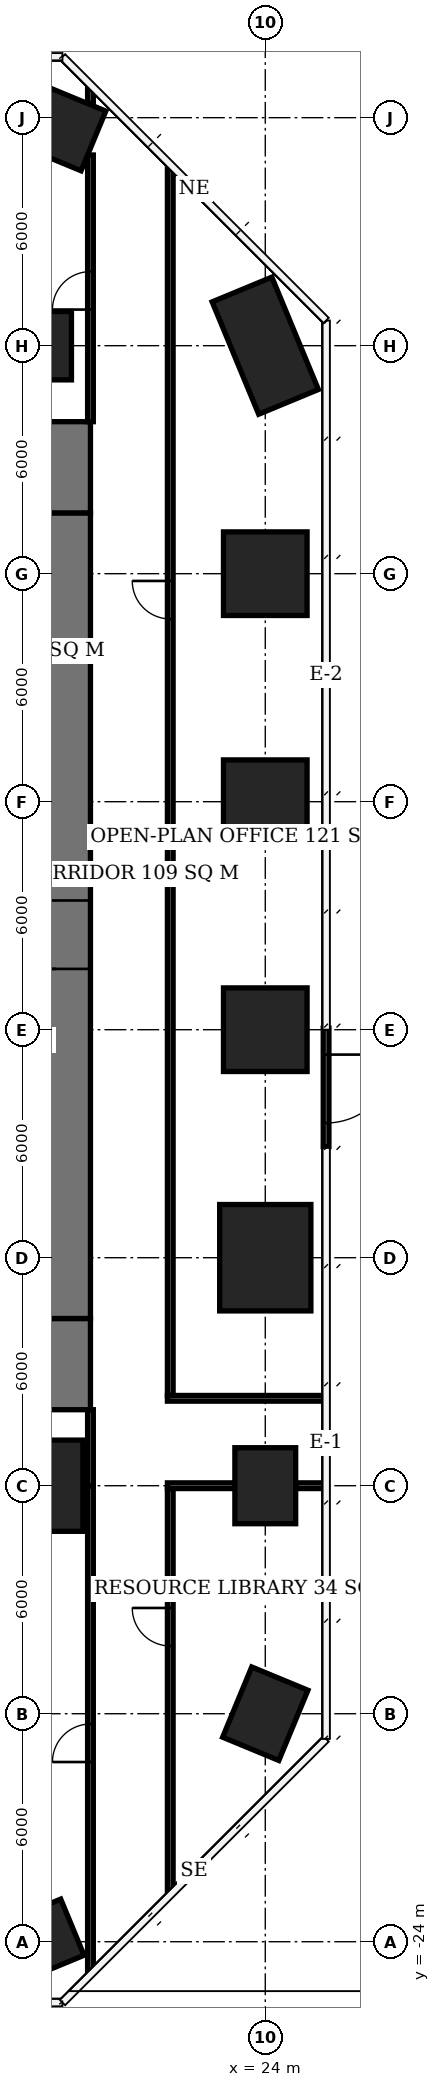
"""IFC4 building model, lengths in metres.
Left out: names, types, materials, properties, quantities, classifications, styles, units other than length and angle.
Written with IfcOpenShell. Run it as: python <this file> out.ifc"""

import sys

from ifc_helpers import new_model, si_unit, direction, frame, frame_2d, origin, origin_2d, place, context, subcontext, project, spatial, rectangle, extrude, element, fill, save


model = new_model("IFC4")
c1 = context("Model", 3, precision=1e-05, world=origin(), true_north=direction((0.0, 1.0)))
c2 = subcontext(c1, "Body", "Model", "MODEL_VIEW")
j1 = project(units=[si_unit("LENGTHUNIT", "METRE"), si_unit("PLANEANGLEUNIT", "RADIAN")], contexts=[c1])
p1 = place(None, origin())
s1 = spatial("IfcSite", under=j1, at=p1, CompositionType="ELEMENT")
p2 = place(p1, origin())
s2 = spatial("IfcBuilding", under=s1, at=p2, CompositionType="ELEMENT")
p3 = place(p2, frame((0.0, 0.0, 18.2)))
s3 = spatial("IfcBuildingStorey", under=s2, at=p3, CompositionType="ELEMENT", Elevation=18.2)
p4 = place(p3, frame((18.0, -24.0, 0.0), z_axis=(0.0, 0.0, 1.0), x_axis=(-0.923879532511, -0.382683432365, 0.0)))
e1 = element("IfcColumn", 1, at=p4, inside=s3, PredefinedType="COLUMN", context=c2, shape_type="SweptSolid", body=[
    extrude(rectangle(XDim=2.0, YDim=1.6, at=origin_2d()), origin(), (0.0, 0.0, 1.0), 3.9),
])
p5 = place(p3, frame((18.0, -12.0, 0.0), z_axis=(0.0, 0.0, 1.0), x_axis=(1.0, 0.0, 0.0)))
e2 = element("IfcColumn", 2, at=p5, inside=s3, PredefinedType="COLUMN", context=c2, shape_type="SweptSolid", body=[
    extrude(rectangle(XDim=2.4, YDim=2.4, at=origin_2d()), origin(), (0.0, 0.0, 1.0), 3.9),
])
p6 = place(p3, frame((18.0, 18.0, 0.0), z_axis=(0.0, 0.0, 1.0), x_axis=(1.0, 0.0, 0.0)))
e3 = element("IfcColumn", 3, at=p6, inside=s3, PredefinedType="COLUMN", context=c2, shape_type="SweptSolid", body=[
    extrude(rectangle(XDim=1.8, YDim=1.8, at=origin_2d()), origin(), (0.0, 0.0, 1.0), 3.9),
])
p7 = place(p3, frame((18.0, 24.0, 0.0), z_axis=(0.0, 0.0, 1.0), x_axis=(0.923879532511, -0.382683432365, 0.0)))
e4 = element("IfcColumn", 4, at=p7, inside=s3, PredefinedType="COLUMN", context=c2, shape_type="SweptSolid", body=[
    extrude(rectangle(XDim=3.2, YDim=1.7, at=origin_2d()), origin(), (0.0, 0.0, 1.0), 3.9),
])
for number, where, z_axis, x_axis in (
    (5, (24.0, -18.0, 0.0), (0.0, 0.0, 1.0), (-0.383, -0.924, 0.0)),
    (6, (24.0, -12.0, 0.0), (0.0, 0.0, 1.0), (0.0, 1.0, 0.0)),
):
    element("IfcColumn", number, at=place(p3, frame(where, z_axis=z_axis, x_axis=x_axis)), inside=s3, PredefinedType="COLUMN", context=c2, shape_type="SweptSolid", body=[
        extrude(rectangle(XDim=2.0, YDim=1.6, at=origin_2d()), origin(), (0.0, 0.0, 1.0), 3.9),
    ])
p8 = place(p3, frame((24.0, -6.0, 0.0), z_axis=(0.0, 0.0, 1.0), x_axis=(0.0, 1.0, 0.0)))
e7 = element("IfcColumn", 7, at=p8, inside=s3, PredefinedType="COLUMN", context=c2, shape_type="SweptSolid", body=[
    extrude(rectangle(XDim=2.8, YDim=2.4, at=origin_2d()), origin(), (0.0, 0.0, 1.0), 3.9),
])
for number, where, z_axis, x_axis in (
    (8, (24.0, 0.0, 0.0), (0.0, 0.0, 1.0), (1.0, 0.0, 0.0)),
    (9, (24.0, 6.0, 0.0), (0.0, 0.0, 1.0), (1.0, 0.0, 0.0)),
    (10, (24.0, 12.0, 0.0), (0.0, 0.0, 1.0), (1.0, 0.0, 0.0)),
):
    element("IfcColumn", number, at=place(p3, frame(where, z_axis=z_axis, x_axis=x_axis)), inside=s3, PredefinedType="COLUMN", context=c2, shape_type="SweptSolid", body=[
        extrude(rectangle(XDim=2.2, YDim=2.2, at=origin_2d()), origin(), (0.0, 0.0, 1.0), 3.9),
    ])
p9 = place(p3, frame((24.0, 18.0, 0.0), z_axis=(0.0, 0.0, 1.0), x_axis=(0.382683432365, -0.923879532511, 0.0)))
e11 = element("IfcColumn", 11, at=p9, inside=s3, PredefinedType="COLUMN", context=c2, shape_type="SweptSolid", body=[
    extrude(rectangle(XDim=3.2, YDim=1.7, at=origin_2d()), origin(), (0.0, 0.0, 1.0), 3.9),
])
p10 = place(p3, frame((18.5, -7.6, 0.0), z_axis=(0.0, 0.0, 1.0), x_axis=(0.0, 1.0, 0.0)))
e12 = element("IfcWall", 12, at=p10, inside=s3, PredefinedType="SHEAR", context=c2, shape_type="SweptSolid", body=[
    extrude(rectangle(XDim=21.2, YDim=1.8, at=frame_2d((10.6, 0.0))), origin(), (0.0, 0.0, 1.0), 3.9),
])
p11 = place(p10, frame((9.2, 0.0, 0.0)))
e13 = element("IfcOpeningElement", 13, at=p11, cuts=e12, PredefinedType="OPENING", context=c2, shape_type="SweptSolid", body=[
    extrude(rectangle(XDim=1.8, YDim=2.4, at=frame_2d((0.9, 1.2))), frame((0.0, 0.91, 0.0), z_axis=(0.0, -1.0, 0.0), x_axis=(1.0, 0.0, 0.0)), (0.0, 0.0, 1.0), 1.82),
])
for number, where, z_axis, x_axis in (
    (14, (18.5, -10.0, 0.0), (0.0, 0.0, 1.0), (0.0, 1.0, 0.0)),
    (15, (18.5, 13.6, 0.0), (0.0, 0.0, 1.0), (0.0, 1.0, 0.0)),
):
    element("IfcWall", number, at=place(p3, frame(where, z_axis=z_axis, x_axis=x_axis)), inside=s3, PredefinedType="SHEAR", context=c2, shape_type="SweptSolid", body=[
        extrude(rectangle(XDim=2.4, YDim=1.8, at=frame_2d((1.2, 0.0))), origin(), (0.0, 0.0, 1.0), 3.9),
    ])
p12 = place(p3, frame((25.6, 0.042, 0.0), z_axis=(0.0, 0.0, 1.0), x_axis=(0.0, -1.0, 0.0)))
e16 = element("IfcWall", 16, at=p12, inside=s3, PredefinedType="USERDEFINED", context=c2, shape_type="SweptSolid", body=[
    extrude(rectangle(XDim=3.12, YDim=0.15, at=frame_2d((1.56, 0.0))), origin(), (0.0, 0.0, 1.0), 3.9),
])
p13 = place(p12, frame((0.698, 0.0, 0.0)))
e17 = element("IfcOpeningElement", 17, at=p13, cuts=e16, PredefinedType="OPENING", context=c2, shape_type="SweptSolid", body=[
    extrude(rectangle(XDim=1.8, YDim=2.4, at=frame_2d((0.9, 1.2))), frame((0.0, 0.085, 0.0), z_axis=(0.0, -1.0, 0.0), x_axis=(1.0, 0.0, 0.0)), (0.0, 0.0, 1.0), 0.17),
])
p14 = place(p3, frame((19.4, -24.771, 0.0), z_axis=(0.0, 0.0, 1.0), x_axis=(0.0, 1.0, 0.0)))
e18 = element("IfcWall", 18, at=p14, inside=s3, PredefinedType="PARTITIONING", context=c2, shape_type="SweptSolid", body=[
    extrude(rectangle(XDim=12.771, YDim=0.15, at=frame_2d((6.385, 0.0))), origin(), (0.0, 0.0, 1.0), 3.65),
])
p15 = place(p14, frame((5.5, 0.0, 0.0)))
e19 = element("IfcOpeningElement", 19, at=p15, cuts=e18, PredefinedType="OPENING", context=c2, shape_type="SweptSolid", body=[
    extrude(rectangle(XDim=1.0, YDim=2.1, at=frame_2d((0.5, 1.05))), frame((0.0, 0.085, 0.0), z_axis=(0.0, -1.0, 0.0), x_axis=(1.0, 0.0, 0.0)), (0.0, 0.0, 1.0), 0.17),
])
p16 = place(p3, frame((19.4, -12.0, 0.0), z_axis=(0.0, 0.0, 1.0), x_axis=(0.0, 1.0, 0.0)))
e20 = element("IfcWall", 20, at=p16, inside=s3, PredefinedType="PARTITIONING", context=c2, shape_type="SweptSolid", body=[
    extrude(rectangle(XDim=2.0, YDim=0.15, at=frame_2d((1.0, 0.0))), origin(), (0.0, 0.0, 1.0), 3.65),
])
p17 = place(p3, frame((19.4, 16.0, 0.0), z_axis=(0.0, 0.0, 1.0), x_axis=(0.0, 1.0, 0.0)))
e21 = element("IfcWall", 21, at=p17, inside=s3, PredefinedType="PARTITIONING", context=c2, shape_type="SweptSolid", body=[
    extrude(rectangle(XDim=7.018, YDim=0.15, at=frame_2d((3.509, 0.0))), origin(), (0.0, 0.0, 1.0), 3.65),
])
p18 = place(p17, frame((2.95, 0.0, 0.0)))
e22 = element("IfcOpeningElement", 22, at=p18, cuts=e21, PredefinedType="OPENING", context=c2, shape_type="SweptSolid", body=[
    extrude(rectangle(XDim=1.0, YDim=2.1, at=frame_2d((0.5, 1.05))), frame((0.0, 0.085, 0.0), z_axis=(0.0, -1.0, 0.0), x_axis=(1.0, 0.0, 0.0)), (0.0, 0.0, 1.0), 0.17),
])
p19 = place(p3, frame((19.4, 24.371, 0.0), z_axis=(0.0, 0.0, 1.0), x_axis=(0.0, 1.0, 0.0)))
e23 = element("IfcWall", 23, at=p19, inside=s3, PredefinedType="PARTITIONING", context=c2, shape_type="SweptSolid", body=[
    extrude(rectangle(XDim=0.4, YDim=0.15, at=frame_2d((0.2, 0.0))), origin(), (0.0, 0.0, 1.0), 3.65),
])
p20 = place(p3, frame((21.5, -22.671, 0.0), z_axis=(0.0, 0.0, 1.0), x_axis=(0.0, 1.0, 0.0)))
e24 = element("IfcWall", 24, at=p20, inside=s3, PredefinedType="PARTITIONING", context=c2, shape_type="SweptSolid", body=[
    extrude(rectangle(XDim=10.596, YDim=0.15, at=frame_2d((5.298, 0.0))), origin(), (0.0, 0.0, 1.0), 3.65),
])
p21 = place(p20, frame((6.454, 0.0, 0.0)))
e25 = element("IfcOpeningElement", 25, at=p21, cuts=e24, PredefinedType="OPENING", context=c2, shape_type="SweptSolid", body=[
    extrude(rectangle(XDim=1.0, YDim=2.1, at=frame_2d((0.5, 1.05))), frame((0.0, 0.085, 0.0), z_axis=(0.0, -1.0, 0.0), x_axis=(1.0, 0.0, 0.0)), (0.0, 0.0, 1.0), 0.17),
])
p22 = place(p3, frame((21.425, -12.0, 0.0), z_axis=(0.0, 0.0, 1.0), x_axis=(1.0, 0.0, 0.0)))
e26 = element("IfcWall", 26, at=p22, inside=s3, PredefinedType="PARTITIONING", context=c2, shape_type="SweptSolid", body=[
    extrude(rectangle(XDim=1.775, YDim=0.15, at=frame_2d((0.887, 0.0))), origin(), (0.0, 0.0, 1.0), 3.65),
])
p23 = place(p3, frame((24.8, -12.0, 0.0), z_axis=(0.0, 0.0, 1.0), x_axis=(1.0, 0.0, 0.0)))
e27 = element("IfcWall", 27, at=p23, inside=s3, PredefinedType="PARTITIONING", context=c2, shape_type="SweptSolid", body=[
    extrude(rectangle(XDim=0.8, YDim=0.15, at=frame_2d((0.4, 0.0))), origin(), (0.0, 0.0, 1.0), 3.65),
])
p24 = place(p3, frame((21.5, -9.625, 0.0), z_axis=(0.0, 0.0, 1.0), x_axis=(0.0, 1.0, 0.0)))
e28 = element("IfcWall", 28, at=p24, inside=s3, PredefinedType="PARTITIONING", context=c2, shape_type="SweptSolid", body=[
    extrude(rectangle(XDim=32.296, YDim=0.15, at=frame_2d((16.148, 0.0))), origin(), (0.0, 0.0, 1.0), 3.65),
])
p25 = place(p24, frame((20.434, 0.0, 0.0)))
e29 = element("IfcOpeningElement", 29, at=p25, cuts=e28, PredefinedType="OPENING", context=c2, shape_type="SweptSolid", body=[
    extrude(rectangle(XDim=1.0, YDim=2.1, at=frame_2d((0.5, 1.05))), frame((0.0, 0.085, 0.0), z_axis=(0.0, -1.0, 0.0), x_axis=(1.0, 0.0, 0.0)), (0.0, 0.0, 1.0), 0.17),
])
p26 = place(p3, frame((21.425, -9.7, 0.0), z_axis=(0.0, 0.0, 1.0), x_axis=(1.0, 0.0, 0.0)))
e30 = element("IfcWall", 30, at=p26, inside=s3, PredefinedType="PARTITIONING", context=c2, shape_type="SweptSolid", body=[
    extrude(rectangle(XDim=4.175, YDim=0.15, at=frame_2d((2.087, 0.0))), origin(), (0.0, 0.0, 1.0), 3.65),
])
p27 = place(p13, origin())
e31 = element("IfcDoor", 31, at=p27, inside=s3, OperationType="DOUBLE_DOOR_SINGLE_SWING", PredefinedType="DOOR", context=c2, shape_type="SweptSolid", body=[
    extrude(rectangle(XDim=1.8, YDim=2.4, at=frame_2d((0.9, 1.2))), frame((0.0, 0.025, 0.0), z_axis=(0.0, -1.0, 0.0), x_axis=(1.0, 0.0, 0.0)), (0.0, 0.0, 1.0), 0.05),
])
fill(e17, e31)
p28 = place(p11, origin())
e32 = element("IfcDoor", 32, at=p28, inside=s3, OperationType="DOUBLE_DOOR_SINGLE_SWING", PredefinedType="DOOR", context=c2, shape_type="SweptSolid", body=[
    extrude(rectangle(XDim=1.8, YDim=2.4, at=frame_2d((0.9, 1.2))), frame((0.0, 0.025, 0.0), z_axis=(0.0, -1.0, 0.0), x_axis=(1.0, 0.0, 0.0)), (0.0, 0.0, 1.0), 0.05),
])
fill(e13, e32)
p29 = place(p21, origin())
e33 = element("IfcDoor", 33, at=p29, inside=s3, OperationType="SINGLE_SWING_RIGHT", PredefinedType="DOOR", context=c2, shape_type="SweptSolid", body=[
    extrude(rectangle(XDim=1.0, YDim=2.1, at=frame_2d((0.5, 1.05))), frame((0.0, 0.025, 0.0), z_axis=(0.0, -1.0, 0.0), x_axis=(1.0, 0.0, 0.0)), (0.0, 0.0, 1.0), 0.05),
])
fill(e25, e33)
p30 = place(p25, origin())
e34 = element("IfcDoor", 34, at=p30, inside=s3, OperationType="SINGLE_SWING_RIGHT", PredefinedType="DOOR", context=c2, shape_type="SweptSolid", body=[
    extrude(rectangle(XDim=1.0, YDim=2.1, at=frame_2d((0.5, 1.05))), frame((0.0, 0.025, 0.0), z_axis=(0.0, -1.0, 0.0), x_axis=(1.0, 0.0, 0.0)), (0.0, 0.0, 1.0), 0.05),
])
fill(e29, e34)
p31 = place(p15, origin())
e35 = element("IfcDoor", 35, at=p31, inside=s3, OperationType="SINGLE_SWING_LEFT", PredefinedType="DOOR", context=c2, shape_type="SweptSolid", body=[
    extrude(rectangle(XDim=1.0, YDim=2.1, at=frame_2d((0.5, 1.05))), frame((0.0, 0.025, 0.0), z_axis=(0.0, -1.0, 0.0), x_axis=(1.0, 0.0, 0.0)), (0.0, 0.0, 1.0), 0.05),
])
fill(e19, e35)
p32 = place(p18, origin())
e36 = element("IfcDoor", 36, at=p32, inside=s3, OperationType="SINGLE_SWING_LEFT", PredefinedType="DOOR", context=c2, shape_type="SweptSolid", body=[
    extrude(rectangle(XDim=1.0, YDim=2.1, at=frame_2d((0.5, 1.05))), frame((0.0, 0.025, 0.0), z_axis=(0.0, -1.0, 0.0), x_axis=(1.0, 0.0, 0.0)), (0.0, 0.0, 1.0), 0.05),
])
fill(e22, e36)
save(model, sys.argv[1])
